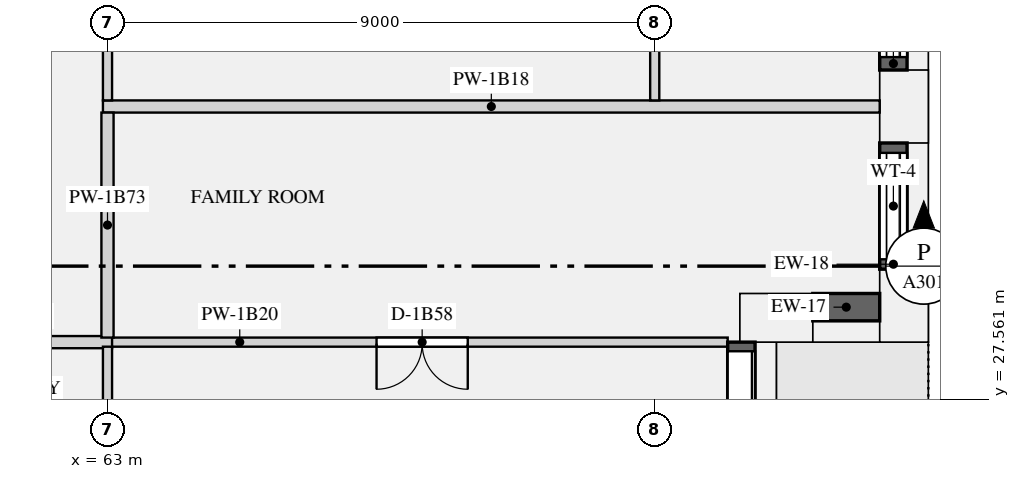
"""IFC4 building model, lengths in metres.
Left out: names, types, materials, properties, quantities, classifications, styles, units other than length and angle.
Written with IfcOpenShell. Run it as: python <this file> out.ifc"""

import sys

from ifc_helpers import new_model, si_unit, direction, frame, frame_2d, origin, origin_2d, place, context, subcontext, project, spatial, rectangle, extrude, element, fill, save


model = new_model("IFC4")
c1 = context("Model", 3, precision=1e-05, world=origin(), true_north=direction((0.0, 1.0)))
c2 = subcontext(c1, "Body", "Model", "MODEL_VIEW")
j1 = project(units=[si_unit("LENGTHUNIT", "METRE"), si_unit("PLANEANGLEUNIT", "RADIAN")], contexts=[c1])
p1 = place(None, origin())
s1 = spatial("IfcSite", under=j1, at=p1, CompositionType="ELEMENT")
p2 = place(p1, origin())
s2 = spatial("IfcBuilding", under=s1, at=p2, CompositionType="ELEMENT")
p3 = place(p2, frame((0.0, 0.0, 28.95)))
s3 = spatial("IfcBuildingStorey", under=s2, at=p3, CompositionType="ELEMENT", Elevation=28.95)
for number, where, z_axis, x_axis in (
    (1, (74.0, 28.9, 0.0), (0.0, 0.0, 1.0), (1.0, 0.0, 0.0)),
    (2, (76.1, 29.1, 0.0), (0.0, 0.0, 1.0), (0.0, 1.0, 0.0)),
    (3, (76.1, 32.375, 0.0), (0.0, 0.0, 1.0), (0.0, 1.0, 0.0)),
):
    element("IfcColumn", number, at=place(p3, frame(where, z_axis=z_axis, x_axis=x_axis)), inside=s3, PredefinedType="USERDEFINED", context=c2, shape_type="SweptSolid", body=[
        extrude(rectangle(XDim=1.2, YDim=0.8, at=origin_2d()), origin(), (0.0, 0.0, 1.0), 3.15),
    ])
p4 = place(p3, frame((73.425, 25.1, 0.0), z_axis=(0.0, 0.0, 1.0), x_axis=(0.0, 1.0, 0.0)))
e4 = element("IfcWall", 4, at=p4, inside=s3, PredefinedType="SOLIDWALL", context=c2, shape_type="SweptSolid", body=[
    extrude(rectangle(XDim=3.4, YDim=0.45, at=frame_2d((1.7, 0.0))), origin(), (0.0, 0.0, 1.0), 2.83),
])
p5 = place(p4, frame((0.15, 0.0, 0.0)))
e5 = element("IfcOpeningElement", 5, at=p5, cuts=e4, PredefinedType="OPENING", context=c2, shape_type="SweptSolid", body=[
    extrude(rectangle(XDim=3.1, YDim=2.3, at=frame_2d((1.55, 1.15))), frame((0.0, 0.235, 0.0), z_axis=(0.0, -1.0, 0.0), x_axis=(1.0, 0.0, 0.0)), (0.0, 0.0, 1.0), 0.47),
])
p6 = place(p3, frame((74.6, 29.075, 0.9), z_axis=(0.0, 0.0, 1.0), x_axis=(1.0, 0.0, 0.0)))
e6 = element("IfcWall", 6, at=p6, inside=s3, PredefinedType="SOLIDWALL", context=c2, shape_type="SweptSolid", body=[
    extrude(rectangle(XDim=1.1, YDim=0.45, at=frame_2d((0.55, 0.0))), origin(), (0.0, 0.0, 1.0), 1.93),
])
p7 = place(p3, frame((75.925, 29.7, 0.9), z_axis=(0.0, 0.0, 1.0), x_axis=(0.0, 1.0, 0.0)))
e7 = element("IfcWall", 7, at=p7, inside=s3, PredefinedType="SOLIDWALL", context=c2, shape_type="SweptSolid", body=[
    extrude(rectangle(XDim=2.075, YDim=0.45, at=frame_2d((1.038, 0.0))), origin(), (0.0, 0.0, 1.0), 1.93),
])
p8 = place(p7, frame((0.163, 0.0, 0.15)))
e8 = element("IfcOpeningElement", 8, at=p8, cuts=e7, PredefinedType="OPENING", context=c2, shape_type="SweptSolid", body=[
    extrude(rectangle(XDim=1.75, YDim=1.5, at=frame_2d((0.875, 0.75))), frame((0.0, 0.235, 0.0), z_axis=(0.0, -1.0, 0.0), x_axis=(1.0, 0.0, 0.0)), (0.0, 0.0, 1.0), 0.47),
])
p9 = place(p3, frame((75.925, 32.975, 0.9), z_axis=(0.0, 0.0, 1.0), x_axis=(0.0, 1.0, 0.0)))
e9 = element("IfcWall", 9, at=p9, inside=s3, PredefinedType="SOLIDWALL", context=c2, shape_type="SweptSolid", body=[
    extrude(rectangle(XDim=2.675, YDim=0.45, at=frame_2d((1.337, 0.0))), origin(), (0.0, 0.0, 1.0), 1.93),
])
p10 = place(p9, frame((0.212, 0.0, 0.15)))
e10 = element("IfcOpeningElement", 10, at=p10, cuts=e9, PredefinedType="OPENING", context=c2, shape_type="SweptSolid", body=[
    extrude(rectangle(XDim=2.25, YDim=1.5, at=frame_2d((1.125, 0.75))), frame((0.0, 0.235, 0.0), z_axis=(0.0, -1.0, 0.0), x_axis=(1.0, 0.0, 0.0)), (0.0, 0.0, 1.0), 0.47),
])
p11 = place(p3, frame((62.925, 32.375, 0.0), z_axis=(0.0, 0.0, 1.0), x_axis=(1.0, 0.0, 0.0)))
e11 = element("IfcWall", 11, at=p11, inside=s3, PredefinedType="PARTITIONING", context=c2, shape_type="SweptSolid", body=[
    extrude(rectangle(XDim=12.775, YDim=0.2, at=frame_2d((6.387, 0.0))), origin(), (0.0, 0.0, 1.0), 2.83),
])
p12 = place(p3, frame((62.925, 28.5, 0.0), z_axis=(0.0, 0.0, 1.0), x_axis=(1.0, 0.0, 0.0)))
e12 = element("IfcWall", 12, at=p12, inside=s3, PredefinedType="PARTITIONING", context=c2, shape_type="SweptSolid", body=[
    extrude(rectangle(XDim=10.275, YDim=0.15, at=frame_2d((5.137, 0.0))), origin(), (0.0, 0.0, 1.0), 2.83),
])
p13 = place(p12, frame((4.5, 0.0, 0.0)))
e13 = element("IfcOpeningElement", 13, at=p13, cuts=e12, PredefinedType="OPENING", context=c2, shape_type="SweptSolid", body=[
    extrude(rectangle(XDim=1.5, YDim=2.1, at=frame_2d((0.75, 1.05))), frame((0.0, 0.085, 0.0), z_axis=(0.0, -1.0, 0.0), x_axis=(1.0, 0.0, 0.0)), (0.0, 0.0, 1.0), 0.17),
])
p14 = place(p3, frame((59.8, 28.5, 0.0), z_axis=(0.0, 0.0, 1.0), x_axis=(1.0, 0.0, 0.0)))
e14 = element("IfcWall", 14, at=p14, inside=s3, PredefinedType="PARTITIONING", context=c2, shape_type="SweptSolid", body=[
    extrude(rectangle(XDim=3.275, YDim=0.2, at=frame_2d((1.637, 0.0))), origin(), (0.0, 0.0, 1.0), 2.83),
])
p15 = place(p3, frame((63.0, 24.075, 0.0), z_axis=(0.0, 0.0, 1.0), x_axis=(0.0, 1.0, 0.0)))
e15 = element("IfcWall", 15, at=p15, inside=s3, PredefinedType="PARTITIONING", context=c2, shape_type="SweptSolid", body=[
    extrude(rectangle(XDim=4.35, YDim=0.15, at=frame_2d((2.175, 0.0))), origin(), (0.0, 0.0, 1.0), 2.83),
])
p16 = place(p15, frame((2.1, 0.0, 0.0)))
e16 = element("IfcOpeningElement", 16, at=p16, cuts=e15, PredefinedType="OPENING", context=c2, shape_type="SweptSolid", body=[
    extrude(rectangle(XDim=0.9, YDim=2.1, at=frame_2d((0.45, 1.05))), frame((0.0, 0.085, 0.0), z_axis=(0.0, -1.0, 0.0), x_axis=(1.0, 0.0, 0.0)), (0.0, 0.0, 1.0), 0.17),
])
p17 = place(p3, frame((63.0, 32.475, 0.0), z_axis=(0.0, 0.0, 1.0), x_axis=(0.0, 1.0, 0.0)))
e17 = element("IfcWall", 17, at=p17, inside=s3, PredefinedType="PARTITIONING", context=c2, shape_type="SweptSolid", body=[
    extrude(rectangle(XDim=7.575, YDim=0.15, at=frame_2d((3.788, 0.0))), origin(), (0.0, 0.0, 1.0), 2.83),
])
p18 = place(p3, frame((63.0, 28.575, 0.0), z_axis=(0.0, 0.0, 1.0), x_axis=(0.0, 1.0, 0.0)))
e18 = element("IfcWall", 18, at=p18, inside=s3, PredefinedType="PARTITIONING", context=c2, shape_type="SweptSolid", body=[
    extrude(rectangle(XDim=3.7, YDim=0.2, at=frame_2d((1.85, 0.0))), origin(), (0.0, 0.0, 1.0), 2.83),
])
p19 = place(p3, frame((72.0, 32.475, 0.0), z_axis=(0.0, 0.0, 1.0), x_axis=(0.0, 1.0, 0.0)))
e19 = element("IfcWall", 19, at=p19, inside=s3, PredefinedType="PARTITIONING", context=c2, shape_type="SweptSolid", body=[
    extrude(rectangle(XDim=7.575, YDim=0.15, at=frame_2d((3.788, 0.0))), origin(), (0.0, 0.0, 1.0), 2.83),
])
p20 = place(p19, frame((4.963, 0.0, 0.0)))
e20 = element("IfcOpeningElement", 20, at=p20, cuts=e19, PredefinedType="OPENING", context=c2, shape_type="SweptSolid", body=[
    extrude(rectangle(XDim=1.5, YDim=2.1, at=frame_2d((0.75, 1.05))), frame((0.0, 0.085, 0.0), z_axis=(0.0, -1.0, 0.0), x_axis=(1.0, 0.0, 0.0)), (0.0, 0.0, 1.0), 0.17),
])
p21 = place(p5, origin())
e21 = element("IfcDoor", 21, at=p21, inside=s3, OperationType="SLIDING_TO_LEFT", PredefinedType="DOOR", context=c2, shape_type="SweptSolid", body=[
    extrude(rectangle(XDim=3.1, YDim=2.3, at=frame_2d((1.55, 1.15))), frame((0.0, -0.07, 0.0), z_axis=(0.0, -1.0, 0.0), x_axis=(1.0, 0.0, 0.0)), (0.0, 0.0, 1.0), 0.05),
])
fill(e5, e21)
p22 = place(p8, origin())
e22 = element("IfcWindow", 22, at=p22, inside=s3, PartitioningType="SINGLE_PANEL", PredefinedType="WINDOW", context=c2, shape_type="SweptSolid", body=[
    extrude(rectangle(XDim=1.75, YDim=1.5, at=frame_2d((0.875, 0.75))), frame((0.0, -0.065, 0.0), z_axis=(0.0, -1.0, 0.0), x_axis=(1.0, 0.0, 0.0)), (0.0, 0.0, 1.0), 0.06),
])
fill(e8, e22)
p23 = place(p10, origin())
e23 = element("IfcWindow", 23, at=p23, inside=s3, PartitioningType="SINGLE_PANEL", PredefinedType="WINDOW", context=c2, shape_type="SweptSolid", body=[
    extrude(rectangle(XDim=2.25, YDim=1.5, at=frame_2d((1.125, 0.75))), frame((0.0, -0.065, 0.0), z_axis=(0.0, -1.0, 0.0), x_axis=(1.0, 0.0, 0.0)), (0.0, 0.0, 1.0), 0.06),
])
fill(e10, e23)
p24 = place(p13, frame((1.5, 0.0, 0.0), z_axis=(0.0, 0.0, 1.0), x_axis=(-1.0, 0.0, 0.0)))
e24 = element("IfcDoor", 24, at=p24, inside=s3, OperationType="DOUBLE_DOOR_SINGLE_SWING", PredefinedType="DOOR", context=c2, shape_type="SweptSolid", body=[
    extrude(rectangle(XDim=1.5, YDim=2.1, at=frame_2d((0.75, 1.05))), frame((0.0, 0.025, 0.0), z_axis=(0.0, -1.0, 0.0), x_axis=(1.0, 0.0, 0.0)), (0.0, 0.0, 1.0), 0.05),
])
fill(e13, e24)
save(model, sys.argv[1])
